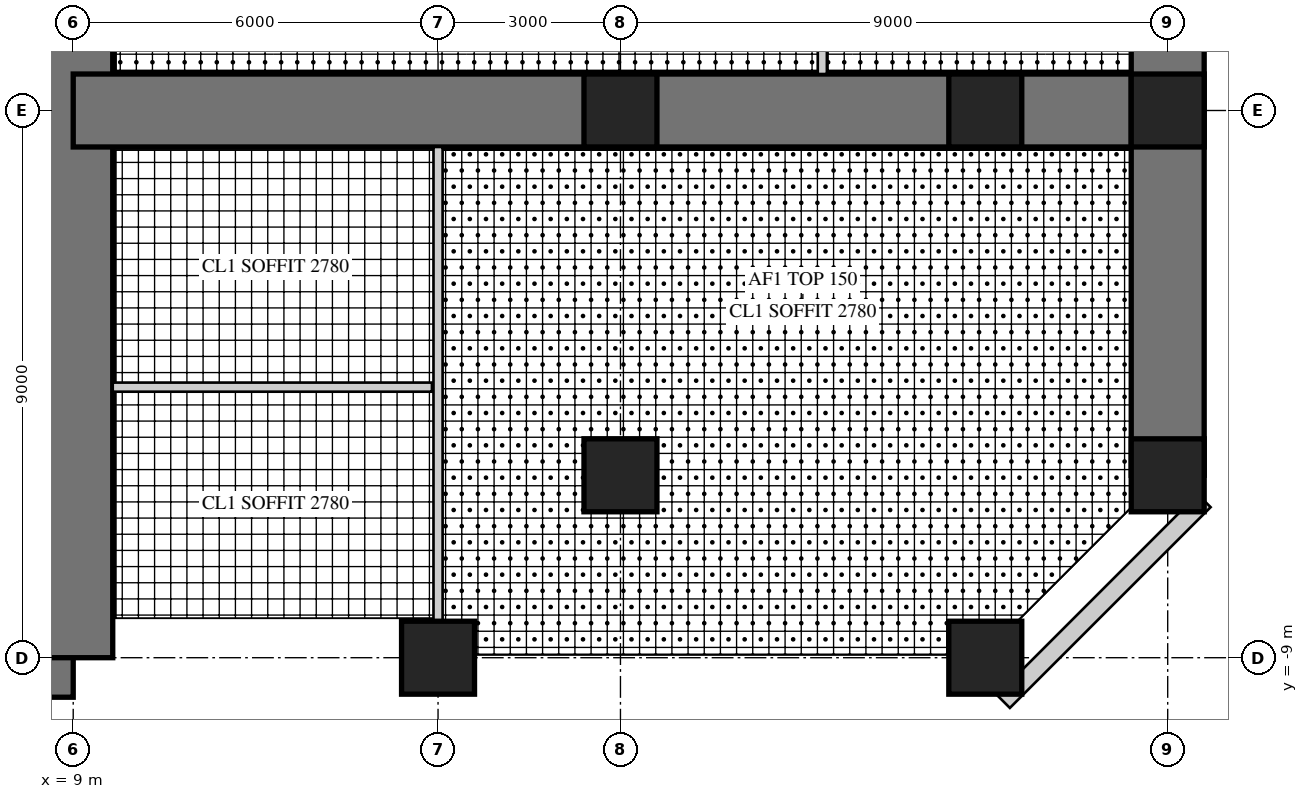
"""IFC4 building model, lengths in metres.
Left out: names, types, materials, properties, quantities, classifications, styles, units other than length and angle.
Written with IfcOpenShell. Run it as: python <this file> out.ifc"""

import sys

from ifc_helpers import new_model, si_unit, direction, frame, frame_2d, origin, origin_2d, place, context, subcontext, project, spatial, rectangle, hollow_rectangle, extrude, element, fill, save


model = new_model("IFC4")
c1 = context("Model", 3, precision=1e-05, world=origin(), true_north=direction((0.0, 1.0)))
c2 = subcontext(c1, "Body", "Model", "MODEL_VIEW")
j1 = project(units=[si_unit("LENGTHUNIT", "METRE"), si_unit("PLANEANGLEUNIT", "RADIAN")], contexts=[c1])
p1 = place(None, origin())
s1 = spatial("IfcSite", under=j1, at=p1, CompositionType="ELEMENT")
p2 = place(p1, origin())
s2 = spatial("IfcBuilding", under=s1, at=p2, CompositionType="ELEMENT")
p3 = place(p2, frame((0.0, 0.0, 79.5)))
s3 = spatial("IfcBuildingStorey", under=s2, at=p3, CompositionType="ELEMENT", Elevation=79.5)
p4 = place(p3, frame((-9.0, -9.0, 0.0), z_axis=(0.0, 0.0, 1.0), x_axis=(1.0, 0.0, 0.0)))
e1 = element("IfcWall", 1, at=p4, inside=s3, PredefinedType="SHEAR", context=c2, shape_type="SweptSolid", body=[
    extrude(rectangle(XDim=18.0, YDim=1.3, at=frame_2d((9.0, 0.0))), origin(), (0.0, 0.0, 1.0), 4.0),
])
p5 = place(p4, frame((9.8, 0.0, 0.0)))
e2 = element("IfcOpeningElement", 2, at=p5, cuts=e1, PredefinedType="OPENING", context=c2, shape_type="SweptSolid", body=[
    extrude(rectangle(XDim=1.0, YDim=2.4, at=frame_2d((0.5, 1.2))), frame((0.0, 0.66, 0.0), z_axis=(0.0, -1.0, 0.0), x_axis=(1.0, 0.0, 0.0)), (0.0, 0.0, 1.0), 1.32),
])
p6 = place(p3, frame((9.0, -9.0, 0.0), z_axis=(0.0, 0.0, 1.0), x_axis=(0.0, 1.0, 0.0)))
e3 = element("IfcWall", 3, at=p6, inside=s3, PredefinedType="SHEAR", context=c2, shape_type="SweptSolid", body=[
    extrude(rectangle(XDim=18.0, YDim=1.3, at=frame_2d((9.0, 0.0))), origin(), (0.0, 0.0, 1.0), 4.0),
])
p7 = place(p6, frame((9.8, 0.0, 0.0)))
e4 = element("IfcOpeningElement", 4, at=p7, cuts=e3, PredefinedType="OPENING", context=c2, shape_type="SweptSolid", body=[
    extrude(rectangle(XDim=1.0, YDim=2.4, at=frame_2d((0.5, 1.2))), frame((0.0, 0.66, 0.0), z_axis=(0.0, -1.0, 0.0), x_axis=(1.0, 0.0, 0.0)), (0.0, 0.0, 1.0), 1.32),
])
p8 = place(p3, frame((9.0, 0.0, 0.0), z_axis=(0.0, 0.0, 1.0), x_axis=(1.0, 0.0, 0.0)))
e5 = element("IfcWall", 5, at=p8, inside=s3, PredefinedType="SHEAR", context=c2, shape_type="SweptSolid", body=[
    extrude(rectangle(XDim=18.0, YDim=1.2, at=frame_2d((9.0, 0.0))), origin(), (0.0, 0.0, 1.0), 4.0),
])
p9 = place(p8, frame((9.9, 0.0, 0.0)))
e6 = element("IfcOpeningElement", 6, at=p9, cuts=e5, PredefinedType="OPENING", context=c2, shape_type="SweptSolid", body=[
    extrude(rectangle(XDim=1.0, YDim=2.2, at=frame_2d((0.5, 1.1))), frame((0.0, 0.61, 0.0), z_axis=(0.0, -1.0, 0.0), x_axis=(1.0, 0.0, 0.0)), (0.0, 0.0, 1.0), 1.22),
])
p10 = place(p3, frame((27.0, -6.0, 0.0), z_axis=(0.0, 0.0, 1.0), x_axis=(0.0, 1.0, 0.0)))
e7 = element("IfcWall", 7, at=p10, inside=s3, PredefinedType="SHEAR", context=c2, shape_type="SweptSolid", body=[
    extrude(rectangle(XDim=12.0, YDim=1.2, at=frame_2d((6.0, 0.0))), origin(), (0.0, 0.0, 1.0), 4.0),
])
p11 = place(p10, frame((1.6, 0.0, 0.6)))
e8 = element("IfcOpeningElement", 8, at=p11, cuts=e7, PredefinedType="OPENING", context=c2, shape_type="SweptSolid", body=[
    extrude(rectangle(XDim=3.0, YDim=2.4, at=frame_2d((1.5, 1.2))), frame((0.0, 0.61, 0.0), z_axis=(0.0, -1.0, 0.0), x_axis=(1.0, 0.0, 0.0)), (0.0, 0.0, 1.0), 1.22),
])
p12 = place(p10, frame((7.4, 0.0, 0.6)))
e9 = element("IfcOpeningElement", 9, at=p12, cuts=e7, PredefinedType="OPENING", context=c2, shape_type="SweptSolid", body=[
    extrude(rectangle(XDim=3.0, YDim=2.4, at=frame_2d((1.5, 1.2))), frame((0.0, 0.61, 0.0), z_axis=(0.0, -1.0, 0.0), x_axis=(1.0, 0.0, 0.0)), (0.0, 0.0, 1.0), 1.22),
])
for number, where, z_axis, x_axis in (
    (10, (15.0, -9.0, 0.0), (0.0, 0.0, 1.0), (1.0, 0.0, 0.0)),
    (11, (24.0, -9.0, 0.0), (0.0, 0.0, 1.0), (1.0, 0.0, 0.0)),
    (12, (27.0, -6.0, 0.0), (0.0, 0.0, 1.0), (1.0, 0.0, 0.0)),
    (13, (27.0, 0.0, 0.0), (0.0, 0.0, 1.0), (1.0, 0.0, 0.0)),
    (14, (18.0, -6.0, 0.0), (0.0, 0.0, 1.0), (1.0, 0.0, 0.0)),
    (15, (18.0, 0.0, 0.0), (0.0, 0.0, 1.0), (1.0, 0.0, 0.0)),
    (16, (24.0, 0.0, 0.0), (0.0, 0.0, 1.0), (1.0, 0.0, 0.0)),
):
    element("IfcColumn", number, at=place(p3, frame(where, z_axis=z_axis, x_axis=x_axis)), inside=s3, PredefinedType="COLUMN", context=c2, shape_type="SweptSolid", body=[
        extrude(rectangle(XDim=1.2, YDim=1.2, at=origin_2d()), origin(), (0.0, 0.0, 1.0), 4.0),
    ])
p13 = place(p3, frame((24.298, -9.72, 0.0), z_axis=(0.0, 0.0, 1.0), x_axis=(0.707106781187, 0.707106781187, 0.0)))
e17 = element("IfcWall", 17, at=p13, inside=s3, PredefinedType="SOLIDWALL", context=c2, shape_type="SweptSolid", body=[
    extrude(rectangle(XDim=4.669, YDim=0.3, at=frame_2d((2.335, 0.0))), origin(), (0.0, 0.0, 1.0), 3.8),
])
p14 = place(p13, frame((1.885, 0.0, 0.3)))
e18 = element("IfcOpeningElement", 18, at=p14, cuts=e17, PredefinedType="OPENING", context=c2, shape_type="SweptSolid", body=[
    extrude(rectangle(XDim=0.9, YDim=2.4, at=frame_2d((0.45, 1.2))), frame((0.0, 0.16, 0.0), z_axis=(0.0, -1.0, 0.0), x_axis=(1.0, 0.0, 0.0)), (0.0, 0.0, 1.0), 0.32),
])
p15 = place(p3, frame((15.0, -8.4, 0.0), z_axis=(0.0, 0.0, 1.0), x_axis=(0.0, 1.0, 0.0)))
e19 = element("IfcWall", 19, at=p15, inside=s3, PredefinedType="PARTITIONING", context=c2, shape_type="SweptSolid", body=[
    extrude(rectangle(XDim=7.8, YDim=0.15, at=frame_2d((3.9, 0.0))), origin(), (0.0, 0.0, 1.0), 2.95),
])
p16 = place(p15, frame((1.425, 0.0, 0.0)))
e20 = element("IfcOpeningElement", 20, at=p16, cuts=e19, PredefinedType="OPENING", context=c2, shape_type="SweptSolid", body=[
    extrude(rectangle(XDim=1.0, YDim=2.1, at=frame_2d((0.5, 1.05))), frame((0.0, 0.085, 0.0), z_axis=(0.0, -1.0, 0.0), x_axis=(1.0, 0.0, 0.0)), (0.0, 0.0, 1.0), 0.17),
])
p17 = place(p15, frame((5.325, 0.0, 0.0)))
e21 = element("IfcOpeningElement", 21, at=p17, cuts=e19, PredefinedType="OPENING", context=c2, shape_type="SweptSolid", body=[
    extrude(rectangle(XDim=1.0, YDim=2.1, at=frame_2d((0.5, 1.05))), frame((0.0, 0.085, 0.0), z_axis=(0.0, -1.0, 0.0), x_axis=(1.0, 0.0, 0.0)), (0.0, 0.0, 1.0), 0.17),
])
p18 = place(p3, frame((9.65, -4.55, 0.0), z_axis=(0.0, 0.0, 1.0), x_axis=(1.0, 0.0, 0.0)))
e22 = element("IfcWall", 22, at=p18, inside=s3, PredefinedType="PARTITIONING", context=c2, shape_type="SweptSolid", body=[
    extrude(rectangle(XDim=5.25, YDim=0.15, at=frame_2d((2.625, 0.0))), origin(), (0.0, 0.0, 1.0), 3.8),
])
p19 = place(p3, frame((21.32, 0.6, 0.0), z_axis=(0.0, 0.0, 1.0), x_axis=(0.0, 1.0, 0.0)))
e23 = element("IfcWall", 23, at=p19, inside=s3, PredefinedType="PARTITIONING", context=c2, shape_type="SweptSolid", body=[
    extrude(rectangle(XDim=9.08, YDim=0.15, at=frame_2d((4.54, 0.0))), origin(), (0.0, 0.0, 1.0), 3.8),
])
p20 = place(p19, frame((0.45, 0.0, 0.0)))
e24 = element("IfcOpeningElement", 24, at=p20, cuts=e23, PredefinedType="OPENING", context=c2, shape_type="SweptSolid", body=[
    extrude(rectangle(XDim=1.0, YDim=2.2, at=frame_2d((0.5, 1.1))), frame((0.0, 0.085, 0.0), z_axis=(0.0, -1.0, 0.0), x_axis=(1.0, 0.0, 0.0)), (0.0, 0.0, 1.0), 0.17),
])
p21 = place(p14, origin())
e25 = element("IfcWindow", 25, at=p21, inside=s3, PartitioningType="SINGLE_PANEL", PredefinedType="WINDOW", context=c2, shape_type="SweptSolid", body=[
    extrude(hollow_rectangle(XDim=0.9, YDim=2.4, WallThickness=0.06, at=frame_2d((0.45, 1.2))), frame((0.0, 0.03, 0.0), z_axis=(0.0, -1.0, 0.0), x_axis=(1.0, 0.0, 0.0)), (0.0, 0.0, 1.0), 0.06),
    extrude(rectangle(XDim=0.779, YDim=2.279, at=frame_2d((0.45, 1.2))), frame((0.0, 0.03, 0.0), z_axis=(0.0, -1.0, 0.0), x_axis=(1.0, 0.0, 0.0)), (0.0, 0.0, 1.0), 0.06),
])
fill(e18, e25)
p22 = place(p11, origin())
e26 = element("IfcWindow", 26, at=p22, inside=s3, PartitioningType="SINGLE_PANEL", PredefinedType="WINDOW", context=c2, shape_type="SweptSolid", body=[
    extrude(hollow_rectangle(XDim=3.0, YDim=2.4, WallThickness=0.06, at=frame_2d((1.5, 1.2))), frame((0.0, 0.03, 0.0), z_axis=(0.0, -1.0, 0.0), x_axis=(1.0, 0.0, 0.0)), (0.0, 0.0, 1.0), 0.06),
    extrude(rectangle(XDim=2.879, YDim=2.279, at=frame_2d((1.5, 1.2))), frame((0.0, 0.03, 0.0), z_axis=(0.0, -1.0, 0.0), x_axis=(1.0, 0.0, 0.0)), (0.0, 0.0, 1.0), 0.06),
])
fill(e8, e26)
p23 = place(p16, origin())
e27 = element("IfcDoor", 27, at=p23, inside=s3, OperationType="SINGLE_SWING_RIGHT", PredefinedType="DOOR", context=c2, shape_type="SweptSolid", body=[
    extrude(rectangle(XDim=1.0, YDim=2.1, at=frame_2d((0.5, 1.05))), frame((0.0, 0.025, 0.0), z_axis=(0.0, -1.0, 0.0), x_axis=(1.0, 0.0, 0.0)), (0.0, 0.0, 1.0), 0.05),
])
fill(e20, e27)
p24 = place(p17, origin())
e28 = element("IfcDoor", 28, at=p24, inside=s3, OperationType="SINGLE_SWING_LEFT", PredefinedType="DOOR", context=c2, shape_type="SweptSolid", body=[
    extrude(rectangle(XDim=1.0, YDim=2.1, at=frame_2d((0.5, 1.05))), frame((0.0, 0.025, 0.0), z_axis=(0.0, -1.0, 0.0), x_axis=(1.0, 0.0, 0.0)), (0.0, 0.0, 1.0), 0.05),
])
fill(e21, e28)
p25 = place(p9, origin())
e29 = element("IfcDoor", 29, at=p25, inside=s3, OperationType="SINGLE_SWING_RIGHT", PredefinedType="DOOR", context=c2, shape_type="SweptSolid", body=[
    extrude(rectangle(XDim=1.0, YDim=2.2, at=frame_2d((0.5, 1.1))), frame((0.0, 0.025, 0.0), z_axis=(0.0, -1.0, 0.0), x_axis=(1.0, 0.0, 0.0)), (0.0, 0.0, 1.0), 0.05),
])
fill(e6, e29)
p26 = place(p7, frame((1.0, 0.0, 0.0), z_axis=(0.0, 0.0, 1.0), x_axis=(-1.0, 0.0, 0.0)))
e30 = element("IfcDoor", 30, at=p26, inside=s3, OperationType="SINGLE_SWING_RIGHT", PredefinedType="DOOR", context=c2, shape_type="SweptSolid", body=[
    extrude(rectangle(XDim=1.0, YDim=2.4, at=frame_2d((0.5, 1.2))), frame((0.0, -0.005, 0.0), z_axis=(0.0, -1.0, 0.0), x_axis=(1.0, 0.0, 0.0)), (0.0, 0.0, 1.0), 0.05),
])
fill(e4, e30)
save(model, sys.argv[1])
